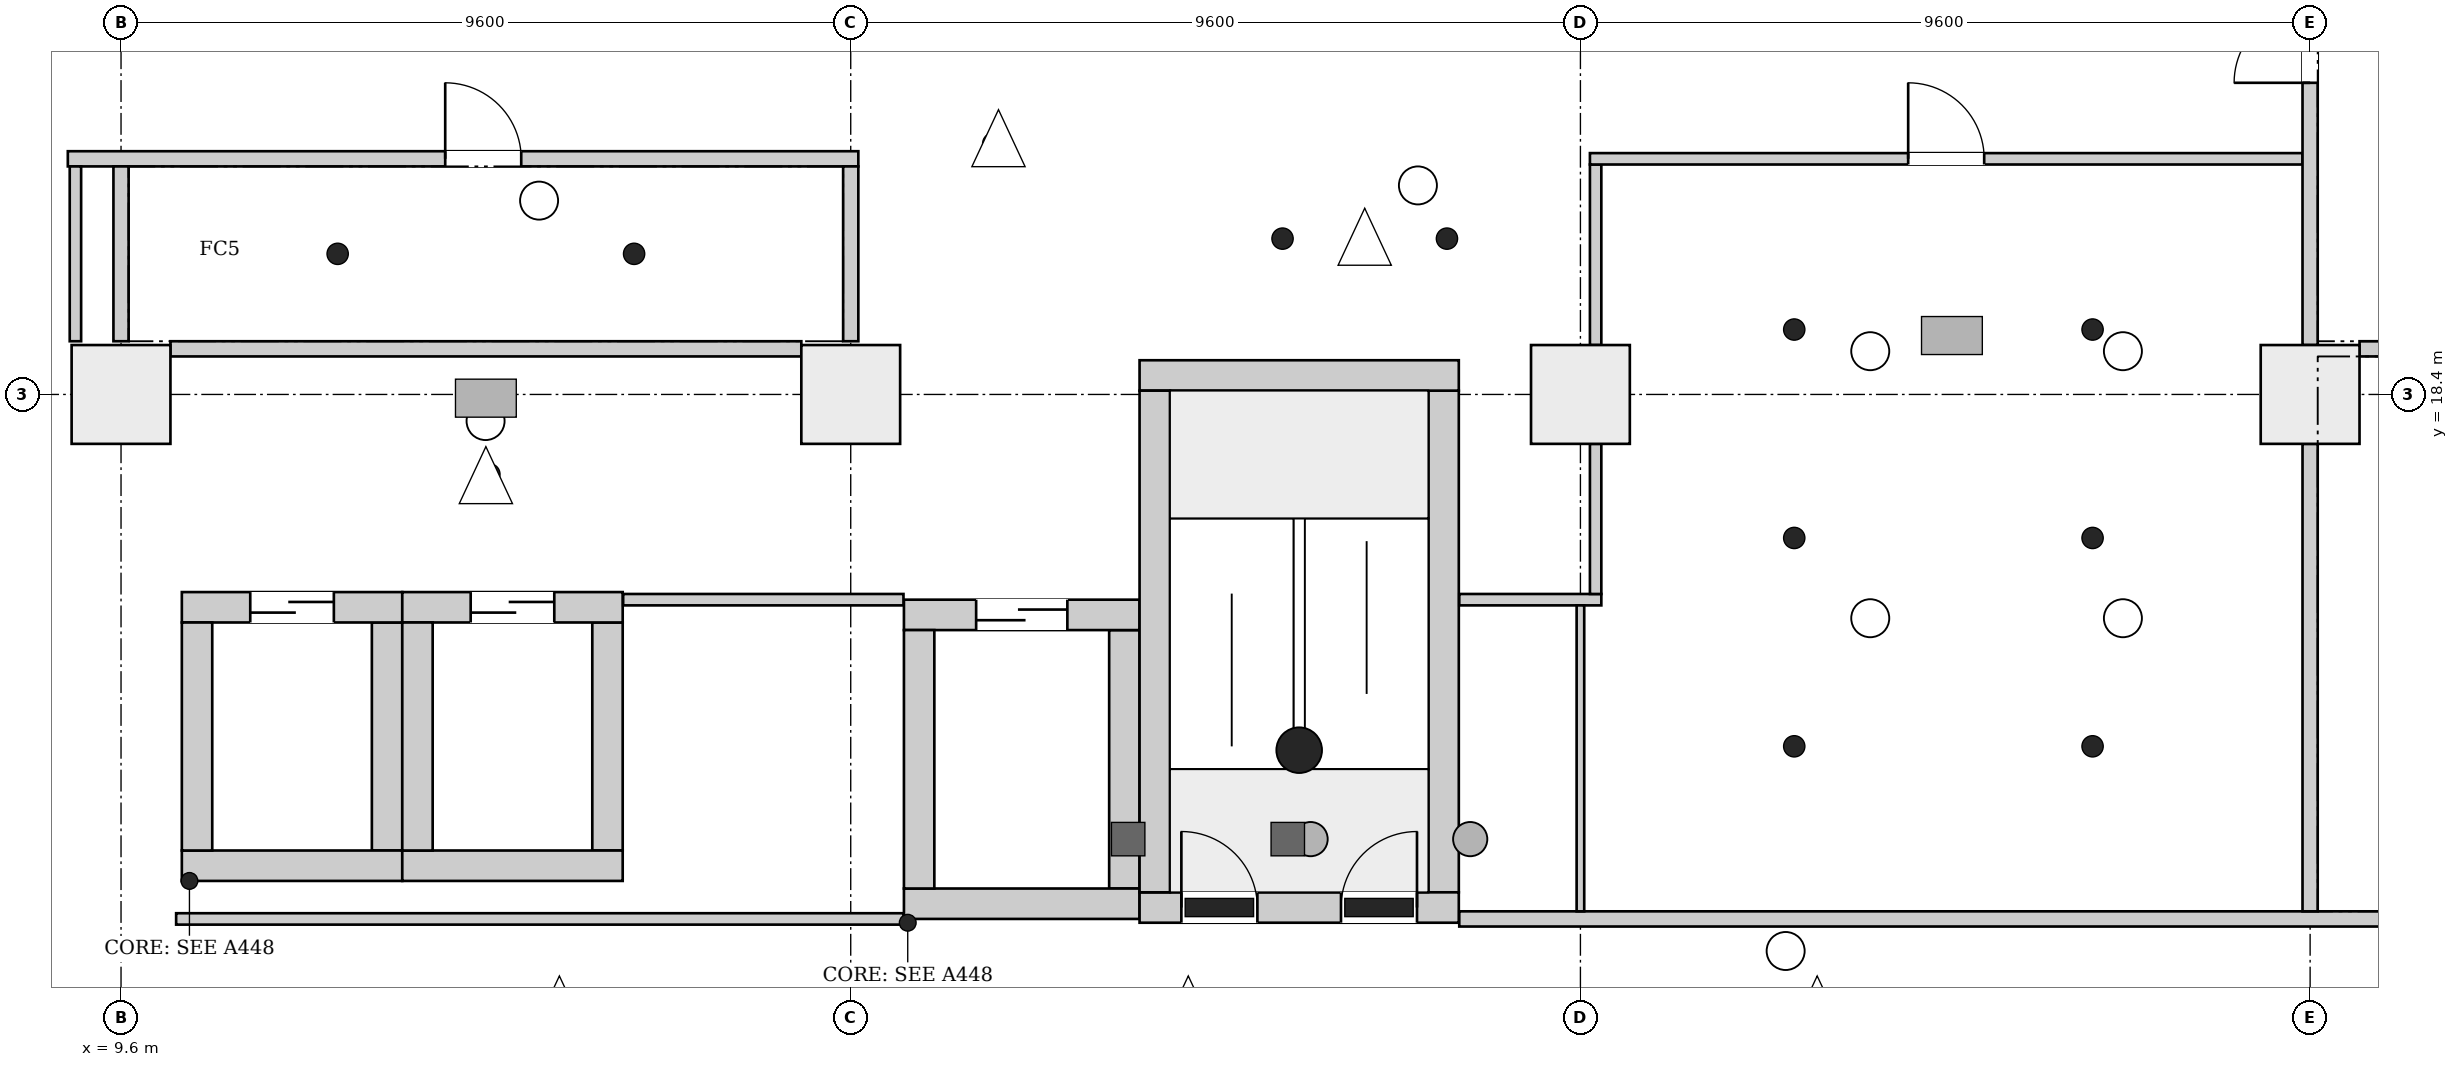
"""IFC4 building model, lengths in metres.
Left out: names, types, materials, properties, quantities, classifications, styles, units other than length and angle.
Written with IfcOpenShell. Run it as: python <this file> out.ifc"""

import sys

from ifc_helpers import new_model, si_unit, direction, frame, frame_2d, origin, origin_2d, place, context, subcontext, project, spatial, rectangle, extrude, element, fill, save


model = new_model("IFC4")
c1 = context("Model", 3, precision=1e-05, world=origin(), true_north=direction((0.0, 1.0)))
c2 = subcontext(c1, "Body", "Model", "MODEL_VIEW")
j1 = project(units=[si_unit("LENGTHUNIT", "METRE"), si_unit("PLANEANGLEUNIT", "RADIAN")], contexts=[c1])
p1 = place(None, origin())
s1 = spatial("IfcSite", under=j1, at=p1, CompositionType="ELEMENT")
p2 = place(p1, origin())
s2 = spatial("IfcBuilding", under=s1, at=p2, CompositionType="ELEMENT")
p3 = place(p2, frame((0.0, 0.0, 6.5)))
s3 = spatial("IfcBuildingStorey", under=s2, at=p3, CompositionType="ELEMENT", Elevation=6.5)
p4 = place(p3, frame((23.0, 11.65, 0.0), z_axis=(0.0, 0.0, 1.0), x_axis=(1.0, 0.0, 0.0)))
e1 = element("IfcWall", 1, at=p4, inside=s3, PredefinedType="SHEAR", context=c2, shape_type="SweptSolid", body=[
    extrude(rectangle(XDim=4.2, YDim=0.4, at=frame_2d((2.1, 0.0))), origin(), (0.0, 0.0, 1.0), 7.7),
])
p5 = place(p4, frame((0.55, 0.0, 0.0)))
e2 = element("IfcOpeningElement", 2, at=p5, cuts=e1, PredefinedType="OPENING", context=c2, shape_type="SweptSolid", body=[
    extrude(rectangle(XDim=1.0, YDim=2.1, at=frame_2d((0.5, 1.05))), frame((0.0, 0.21, 0.0), z_axis=(0.0, -1.0, 0.0), x_axis=(1.0, 0.0, 0.0)), (0.0, 0.0, 1.0), 0.42),
])
p6 = place(p4, frame((2.65, 0.0, 0.0)))
e3 = element("IfcOpeningElement", 3, at=p6, cuts=e1, PredefinedType="OPENING", context=c2, shape_type="SweptSolid", body=[
    extrude(rectangle(XDim=1.0, YDim=2.1, at=frame_2d((0.5, 1.05))), frame((0.0, 0.21, 0.0), z_axis=(0.0, -1.0, 0.0), x_axis=(1.0, 0.0, 0.0)), (0.0, 0.0, 1.0), 0.42),
])
p7 = place(p3, frame((23.0, 18.65, 0.0), z_axis=(0.0, 0.0, 1.0), x_axis=(1.0, 0.0, 0.0)))
e4 = element("IfcWall", 4, at=p7, inside=s3, PredefinedType="SHEAR", context=c2, shape_type="SweptSolid", body=[
    extrude(rectangle(XDim=4.2, YDim=0.4, at=frame_2d((2.1, 0.0))), origin(), (0.0, 0.0, 1.0), 7.7),
])
for number, where, z_axis, x_axis in (
    (5, (23.2, 11.85, 0.0), (0.0, 0.0, 1.0), (0.0, 1.0, 0.0)),
    (6, (27.0, 11.85, 0.0), (0.0, 0.0, 1.0), (0.0, 1.0, 0.0)),
):
    element("IfcWall", number, at=place(p3, frame(where, z_axis=z_axis, x_axis=x_axis)), inside=s3, PredefinedType="SHEAR", context=c2, shape_type="SweptSolid", body=[
        extrude(rectangle(XDim=6.6, YDim=0.4, at=frame_2d((3.3, 0.0))), origin(), (0.0, 0.0, 1.0), 7.7),
    ])
p8 = place(p3, frame((10.4, 12.2, 0.0), z_axis=(0.0, 0.0, 1.0), x_axis=(1.0, 0.0, 0.0)))
e7 = element("IfcWall", 7, at=p8, inside=s3, PredefinedType="SHEAR", context=c2, shape_type="SweptSolid", body=[
    extrude(rectangle(XDim=2.9, YDim=0.4, at=frame_2d((1.45, 0.0))), origin(), (0.0, 0.0, 1.0), 7.7),
])
p9 = place(p3, frame((10.4, 15.6, 0.0), z_axis=(0.0, 0.0, 1.0), x_axis=(1.0, 0.0, 0.0)))
e8 = element("IfcWall", 8, at=p9, inside=s3, PredefinedType="SHEAR", context=c2, shape_type="SweptSolid", body=[
    extrude(rectangle(XDim=2.9, YDim=0.4, at=frame_2d((1.45, 0.0))), origin(), (0.0, 0.0, 1.0), 7.7),
])
p10 = place(p9, frame((0.9, 0.0, 0.0)))
e9 = element("IfcOpeningElement", 9, at=p10, cuts=e8, PredefinedType="OPENING", context=c2, shape_type="SweptSolid", body=[
    extrude(rectangle(XDim=1.1, YDim=2.1, at=frame_2d((0.55, 1.05))), frame((0.0, 0.21, 0.0), z_axis=(0.0, -1.0, 0.0), x_axis=(1.0, 0.0, 0.0)), (0.0, 0.0, 1.0), 0.42),
])
for number, where, z_axis, x_axis in (
    (10, (10.6, 12.4, 0.0), (0.0, 0.0, 1.0), (0.0, 1.0, 0.0)),
    (11, (13.1, 12.4, 0.0), (0.0, 0.0, 1.0), (0.0, 1.0, 0.0)),
):
    element("IfcWall", number, at=place(p3, frame(where, z_axis=z_axis, x_axis=x_axis)), inside=s3, PredefinedType="SHEAR", context=c2, shape_type="SweptSolid", body=[
        extrude(rectangle(XDim=3.0, YDim=0.4, at=frame_2d((1.5, 0.0))), origin(), (0.0, 0.0, 1.0), 7.7),
    ])
p11 = place(p3, frame((13.3, 12.2, 0.0), z_axis=(0.0, 0.0, 1.0), x_axis=(1.0, 0.0, 0.0)))
e12 = element("IfcWall", 12, at=p11, inside=s3, PredefinedType="SHEAR", context=c2, shape_type="SweptSolid", body=[
    extrude(rectangle(XDim=2.9, YDim=0.4, at=frame_2d((1.45, 0.0))), origin(), (0.0, 0.0, 1.0), 7.7),
])
p12 = place(p3, frame((13.3, 15.6, 0.0), z_axis=(0.0, 0.0, 1.0), x_axis=(1.0, 0.0, 0.0)))
e13 = element("IfcWall", 13, at=p12, inside=s3, PredefinedType="SHEAR", context=c2, shape_type="SweptSolid", body=[
    extrude(rectangle(XDim=2.9, YDim=0.4, at=frame_2d((1.45, 0.0))), origin(), (0.0, 0.0, 1.0), 7.7),
])
p13 = place(p12, frame((0.9, 0.0, 0.0)))
e14 = element("IfcOpeningElement", 14, at=p13, cuts=e13, PredefinedType="OPENING", context=c2, shape_type="SweptSolid", body=[
    extrude(rectangle(XDim=1.1, YDim=2.1, at=frame_2d((0.55, 1.05))), frame((0.0, 0.21, 0.0), z_axis=(0.0, -1.0, 0.0), x_axis=(1.0, 0.0, 0.0)), (0.0, 0.0, 1.0), 0.42),
])
for number, where, z_axis, x_axis in (
    (15, (13.5, 12.4, 0.0), (0.0, 0.0, 1.0), (0.0, 1.0, 0.0)),
    (16, (16.0, 12.4, 0.0), (0.0, 0.0, 1.0), (0.0, 1.0, 0.0)),
):
    element("IfcWall", number, at=place(p3, frame(where, z_axis=z_axis, x_axis=x_axis)), inside=s3, PredefinedType="SHEAR", context=c2, shape_type="SweptSolid", body=[
        extrude(rectangle(XDim=3.0, YDim=0.4, at=frame_2d((1.5, 0.0))), origin(), (0.0, 0.0, 1.0), 7.7),
    ])
p14 = place(p3, frame((19.9, 11.7, 0.0), z_axis=(0.0, 0.0, 1.0), x_axis=(1.0, 0.0, 0.0)))
e17 = element("IfcWall", 17, at=p14, inside=s3, PredefinedType="SHEAR", context=c2, shape_type="SweptSolid", body=[
    extrude(rectangle(XDim=3.1, YDim=0.4, at=frame_2d((1.55, 0.0))), origin(), (0.0, 0.0, 1.0), 7.7),
])
p15 = place(p3, frame((19.9, 15.5, 0.0), z_axis=(0.0, 0.0, 1.0), x_axis=(1.0, 0.0, 0.0)))
e18 = element("IfcWall", 18, at=p15, inside=s3, PredefinedType="SHEAR", context=c2, shape_type="SweptSolid", body=[
    extrude(rectangle(XDim=3.1, YDim=0.4, at=frame_2d((1.55, 0.0))), origin(), (0.0, 0.0, 1.0), 7.7),
])
p16 = place(p15, frame((0.95, 0.0, 0.0)))
e19 = element("IfcOpeningElement", 19, at=p16, cuts=e18, PredefinedType="OPENING", context=c2, shape_type="SweptSolid", body=[
    extrude(rectangle(XDim=1.2, YDim=2.1, at=frame_2d((0.6, 1.05))), frame((0.0, 0.21, 0.0), z_axis=(0.0, -1.0, 0.0), x_axis=(1.0, 0.0, 0.0)), (0.0, 0.0, 1.0), 0.42),
])
for number, where, z_axis, x_axis in (
    (20, (20.1, 11.9, 0.0), (0.0, 0.0, 1.0), (0.0, 1.0, 0.0)),
    (21, (22.8, 11.9, 0.0), (0.0, 0.0, 1.0), (0.0, 1.0, 0.0)),
):
    element("IfcWall", number, at=place(p3, frame(where, z_axis=z_axis, x_axis=x_axis)), inside=s3, PredefinedType="SHEAR", context=c2, shape_type="SweptSolid", body=[
        extrude(rectangle(XDim=3.4, YDim=0.4, at=frame_2d((1.7, 0.0))), origin(), (0.0, 0.0, 1.0), 7.7),
    ])
for number, where, z_axis, x_axis in (
    (22, (9.6, 18.4, 0.0), (0.0, 0.0, 1.0), (1.0, 0.0, 0.0)),
    (23, (19.2, 18.4, 0.0), (0.0, 0.0, 1.0), (1.0, 0.0, 0.0)),
    (24, (28.8, 18.4, 0.0), (0.0, 0.0, 1.0), (1.0, 0.0, 0.0)),
    (25, (38.4, 18.4, 0.0), (0.0, 0.0, 1.0), (1.0, 0.0, 0.0)),
):
    element("IfcColumn", number, at=place(p3, frame(where, z_axis=z_axis, x_axis=x_axis)), inside=s3, PredefinedType="COLUMN", context=c2, shape_type="SweptSolid", body=[
        extrude(rectangle(XDim=1.3, YDim=1.3, at=origin_2d()), origin(), (0.0, 0.0, 1.0), 7.7),
    ])
p17 = place(p3, frame((8.9, 21.5, 0.0), z_axis=(0.0, 0.0, 1.0), x_axis=(1.0, 0.0, 0.0)))
e26 = element("IfcWall", 26, at=p17, inside=s3, PredefinedType="PARTITIONING", context=c2, shape_type="SweptSolid", body=[
    extrude(rectangle(XDim=10.4, YDim=0.2, at=frame_2d((5.2, 0.0))), origin(), (0.0, 0.0, 1.0), 7.35),
])
p18 = place(p17, frame((4.965, 0.0, 0.0)))
e27 = element("IfcOpeningElement", 27, at=p18, cuts=e26, PredefinedType="OPENING", context=c2, shape_type="SweptSolid", body=[
    extrude(rectangle(XDim=1.0, YDim=2.1, at=frame_2d((0.5, 1.05))), frame((0.0, 0.11, 0.0), z_axis=(0.0, -1.0, 0.0), x_axis=(1.0, 0.0, 0.0)), (0.0, 0.0, 1.0), 0.22),
])
p19 = place(p3, frame((9.0, 19.1, 0.0), z_axis=(0.0, 0.0, 1.0), x_axis=(0.0, 1.0, 0.0)))
e28 = element("IfcWall", 28, at=p19, inside=s3, PredefinedType="PARTITIONING", context=c2, shape_type="SweptSolid", body=[
    extrude(rectangle(XDim=2.3, YDim=0.15, at=frame_2d((1.15, 0.0))), origin(), (0.0, 0.0, 1.0), 6.95),
])
p20 = place(p3, frame((9.6, 19.1, 0.0), z_axis=(0.0, 0.0, 1.0), x_axis=(0.0, 1.0, 0.0)))
e29 = element("IfcWall", 29, at=p20, inside=s3, PredefinedType="PARTITIONING", context=c2, shape_type="SweptSolid", body=[
    extrude(rectangle(XDim=2.3, YDim=0.2, at=frame_2d((1.15, 0.0))), origin(), (0.0, 0.0, 1.0), 6.95),
])
p21 = place(p3, frame((10.25, 19.0, 0.0), z_axis=(0.0, 0.0, 1.0), x_axis=(1.0, 0.0, 0.0)))
e30 = element("IfcWall", 30, at=p21, inside=s3, PredefinedType="PARTITIONING", context=c2, shape_type="SweptSolid", body=[
    extrude(rectangle(XDim=8.3, YDim=0.2, at=frame_2d((4.15, 0.0))), origin(), (0.0, 0.0, 1.0), 7.35),
])
p22 = place(p3, frame((10.325, 11.5, 0.0), z_axis=(0.0, 0.0, 1.0), x_axis=(1.0, 0.0, 0.0)))
e31 = element("IfcWall", 31, at=p22, inside=s3, PredefinedType="PARTITIONING", context=c2, shape_type="SweptSolid", body=[
    extrude(rectangle(XDim=9.569, YDim=0.15, at=frame_2d((4.785, 0.0))), origin(), (0.0, 0.0, 1.0), 7.35),
])
p23 = place(p3, frame((16.206, 15.7, 0.0), z_axis=(0.0, 0.0, 1.0), x_axis=(1.0, 0.0, 0.0)))
e32 = element("IfcWall", 32, at=p23, inside=s3, PredefinedType="PARTITIONING", context=c2, shape_type="SweptSolid", body=[
    extrude(rectangle(XDim=3.688, YDim=0.15, at=frame_2d((1.844, 0.0))), origin(), (0.0, 0.0, 1.0), 7.35),
])
p24 = place(p3, frame((19.2, 19.1, 0.0), z_axis=(0.0, 0.0, 1.0), x_axis=(0.0, 1.0, 0.0)))
e33 = element("IfcWall", 33, at=p24, inside=s3, PredefinedType="PARTITIONING", context=c2, shape_type="SweptSolid", body=[
    extrude(rectangle(XDim=2.3, YDim=0.2, at=frame_2d((1.15, 0.0))), origin(), (0.0, 0.0, 1.0), 6.95),
])
p25 = place(p3, frame((27.206, 11.5, 0.0), z_axis=(0.0, 0.0, 1.0), x_axis=(1.0, 0.0, 0.0)))
e34 = element("IfcWall", 34, at=p25, inside=s3, PredefinedType="PARTITIONING", context=c2, shape_type="SweptSolid", body=[
    extrude(rectangle(XDim=26.494, YDim=0.2, at=frame_2d((13.247, 0.0))), origin(), (0.0, 0.0, 1.0), 7.35),
])
p26 = place(p25, frame((15.494, 0.0, 0.0)))
e35 = element("IfcOpeningElement", 35, at=p26, cuts=e34, PredefinedType="OPENING", context=c2, shape_type="SweptSolid", body=[
    extrude(rectangle(XDim=1.0, YDim=2.1, at=frame_2d((0.5, 1.05))), frame((0.0, 0.11, 0.0), z_axis=(0.0, -1.0, 0.0), x_axis=(1.0, 0.0, 0.0)), (0.0, 0.0, 1.0), 0.22),
])
p27 = place(p25, frame((23.059, 0.0, 0.0)))
e36 = element("IfcOpeningElement", 36, at=p27, cuts=e34, PredefinedType="OPENING", context=c2, shape_type="SweptSolid", body=[
    extrude(rectangle(XDim=1.0, YDim=2.1, at=frame_2d((0.5, 1.05))), frame((0.0, 0.11, 0.0), z_axis=(0.0, -1.0, 0.0), x_axis=(1.0, 0.0, 0.0)), (0.0, 0.0, 1.0), 0.22),
])
p28 = place(p3, frame((27.206, 15.7, 0.0), z_axis=(0.0, 0.0, 1.0), x_axis=(1.0, 0.0, 0.0)))
e37 = element("IfcWall", 37, at=p28, inside=s3, PredefinedType="PARTITIONING", context=c2, shape_type="SweptSolid", body=[
    extrude(rectangle(XDim=1.869, YDim=0.15, at=frame_2d((0.935, 0.0))), origin(), (0.0, 0.0, 1.0), 7.35),
])
p29 = place(p3, frame((28.8, 11.6, 0.0), z_axis=(0.0, 0.0, 1.0), x_axis=(0.0, 1.0, 0.0)))
e38 = element("IfcWall", 38, at=p29, inside=s3, PredefinedType="PARTITIONING", context=c2, shape_type="SweptSolid", body=[
    extrude(rectangle(XDim=4.025, YDim=0.1, at=frame_2d((2.012, 0.0))), origin(), (0.0, 0.0, 1.0), 6.95),
])
p30 = place(p3, frame((29.0, 15.775, 0.0), z_axis=(0.0, 0.0, 1.0), x_axis=(0.0, 1.0, 0.0)))
e39 = element("IfcWall", 39, at=p30, inside=s3, PredefinedType="PARTITIONING", context=c2, shape_type="SweptSolid", body=[
    extrude(rectangle(XDim=1.975, YDim=0.15, at=frame_2d((0.988, 0.0))), origin(), (0.0, 0.0, 1.0), 6.95),
])
p31 = place(p3, frame((29.0, 19.05, 0.0), z_axis=(0.0, 0.0, 1.0), x_axis=(0.0, 1.0, 0.0)))
e40 = element("IfcWall", 40, at=p31, inside=s3, PredefinedType="PARTITIONING", context=c2, shape_type="SweptSolid", body=[
    extrude(rectangle(XDim=2.375, YDim=0.15, at=frame_2d((1.188, 0.0))), origin(), (0.0, 0.0, 1.0), 6.95),
])
p32 = place(p3, frame((28.925, 21.5, 0.0), z_axis=(0.0, 0.0, 1.0), x_axis=(1.0, 0.0, 0.0)))
e41 = element("IfcWall", 41, at=p32, inside=s3, PredefinedType="PARTITIONING", context=c2, shape_type="SweptSolid", body=[
    extrude(rectangle(XDim=9.375, YDim=0.15, at=frame_2d((4.688, 0.0))), origin(), (0.0, 0.0, 1.0), 7.35),
])
p33 = place(p32, frame((4.187, 0.0, 0.0)))
e42 = element("IfcOpeningElement", 42, at=p33, cuts=e41, PredefinedType="OPENING", context=c2, shape_type="SweptSolid", body=[
    extrude(rectangle(XDim=1.0, YDim=2.1, at=frame_2d((0.5, 1.05))), frame((0.0, 0.085, 0.0), z_axis=(0.0, -1.0, 0.0), x_axis=(1.0, 0.0, 0.0)), (0.0, 0.0, 1.0), 0.17),
])
p34 = place(p3, frame((38.4, 11.6, 0.0), z_axis=(0.0, 0.0, 1.0), x_axis=(0.0, 1.0, 0.0)))
e43 = element("IfcWall", 43, at=p34, inside=s3, PredefinedType="PARTITIONING", context=c2, shape_type="SweptSolid", body=[
    extrude(rectangle(XDim=6.15, YDim=0.2, at=frame_2d((3.075, 0.0))), origin(), (0.0, 0.0, 1.0), 6.95),
])
p35 = place(p3, frame((38.4, 19.05, 0.0), z_axis=(0.0, 0.0, 1.0), x_axis=(0.0, 1.0, 0.0)))
e44 = element("IfcWall", 44, at=p35, inside=s3, PredefinedType="PARTITIONING", context=c2, shape_type="SweptSolid", body=[
    extrude(rectangle(XDim=7.9, YDim=0.2, at=frame_2d((3.95, 0.0))), origin(), (0.0, 0.0, 1.0), 6.95),
])
p36 = place(p35, frame((3.45, 0.0, 0.0)))
e45 = element("IfcOpeningElement", 45, at=p36, cuts=e44, PredefinedType="OPENING", context=c2, shape_type="SweptSolid", body=[
    extrude(rectangle(XDim=1.0, YDim=2.1, at=frame_2d((0.5, 1.05))), frame((0.0, 0.11, 0.0), z_axis=(0.0, -1.0, 0.0), x_axis=(1.0, 0.0, 0.0)), (0.0, 0.0, 1.0), 0.22),
])
p37 = place(p3, frame((39.05, 19.0, 0.0), z_axis=(0.0, 0.0, 1.0), x_axis=(1.0, 0.0, 0.0)))
e46 = element("IfcWall", 46, at=p37, inside=s3, PredefinedType="PARTITIONING", context=c2, shape_type="SweptSolid", body=[
    extrude(rectangle(XDim=8.3, YDim=0.2, at=frame_2d((4.15, 0.0))), origin(), (0.0, 0.0, 1.0), 7.35),
])
p38 = place(p5, origin())
e47 = element("IfcDoor", 47, at=p38, inside=s3, OperationType="SINGLE_SWING_RIGHT", PredefinedType="DOOR", context=c2, shape_type="SweptSolid", body=[
    extrude(rectangle(XDim=1.0, YDim=2.1, at=frame_2d((0.5, 1.05))), frame((0.0, 0.025, 0.0), z_axis=(0.0, -1.0, 0.0), x_axis=(1.0, 0.0, 0.0)), (0.0, 0.0, 1.0), 0.05),
])
fill(e2, e47)
p39 = place(p6, origin())
e48 = element("IfcDoor", 48, at=p39, inside=s3, OperationType="SINGLE_SWING_LEFT", PredefinedType="DOOR", context=c2, shape_type="SweptSolid", body=[
    extrude(rectangle(XDim=1.0, YDim=2.1, at=frame_2d((0.5, 1.05))), frame((0.0, 0.025, 0.0), z_axis=(0.0, -1.0, 0.0), x_axis=(1.0, 0.0, 0.0)), (0.0, 0.0, 1.0), 0.05),
])
fill(e3, e48)
p40 = place(p10, origin())
e49 = element("IfcDoor", 49, at=p40, inside=s3, OperationType="DOUBLE_DOOR_SLIDING", PredefinedType="DOOR", context=c2, shape_type="SweptSolid", body=[
    extrude(rectangle(XDim=1.1, YDim=2.1, at=frame_2d((0.55, 1.05))), frame((0.0, 0.025, 0.0), z_axis=(0.0, -1.0, 0.0), x_axis=(1.0, 0.0, 0.0)), (0.0, 0.0, 1.0), 0.05),
])
fill(e9, e49)
p41 = place(p13, origin())
e50 = element("IfcDoor", 50, at=p41, inside=s3, OperationType="DOUBLE_DOOR_SLIDING", PredefinedType="DOOR", context=c2, shape_type="SweptSolid", body=[
    extrude(rectangle(XDim=1.1, YDim=2.1, at=frame_2d((0.55, 1.05))), frame((0.0, 0.025, 0.0), z_axis=(0.0, -1.0, 0.0), x_axis=(1.0, 0.0, 0.0)), (0.0, 0.0, 1.0), 0.05),
])
fill(e14, e50)
p42 = place(p16, origin())
e51 = element("IfcDoor", 51, at=p42, inside=s3, OperationType="DOUBLE_DOOR_SLIDING", PredefinedType="DOOR", context=c2, shape_type="SweptSolid", body=[
    extrude(rectangle(XDim=1.2, YDim=2.1, at=frame_2d((0.6, 1.05))), frame((0.0, 0.025, 0.0), z_axis=(0.0, -1.0, 0.0), x_axis=(1.0, 0.0, 0.0)), (0.0, 0.0, 1.0), 0.05),
])
fill(e19, e51)
p43 = place(p18, origin())
e52 = element("IfcDoor", 52, at=p43, inside=s3, OperationType="SINGLE_SWING_RIGHT", PredefinedType="DOOR", context=c2, shape_type="SweptSolid", body=[
    extrude(rectangle(XDim=1.0, YDim=2.1, at=frame_2d((0.5, 1.05))), frame((0.0, 0.025, 0.0), z_axis=(0.0, -1.0, 0.0), x_axis=(1.0, 0.0, 0.0)), (0.0, 0.0, 1.0), 0.05),
])
fill(e27, e52)
p44 = place(p33, origin())
e53 = element("IfcDoor", 53, at=p44, inside=s3, OperationType="SINGLE_SWING_RIGHT", PredefinedType="DOOR", context=c2, shape_type="SweptSolid", body=[
    extrude(rectangle(XDim=1.0, YDim=2.1, at=frame_2d((0.5, 1.05))), frame((0.0, 0.025, 0.0), z_axis=(0.0, -1.0, 0.0), x_axis=(1.0, 0.0, 0.0)), (0.0, 0.0, 1.0), 0.05),
])
fill(e42, e53)
p45 = place(p36, origin())
e54 = element("IfcDoor", 54, at=p45, inside=s3, OperationType="SINGLE_SWING_LEFT", PredefinedType="DOOR", context=c2, shape_type="SweptSolid", body=[
    extrude(rectangle(XDim=1.0, YDim=2.1, at=frame_2d((0.5, 1.05))), frame((0.0, 0.025, 0.0), z_axis=(0.0, -1.0, 0.0), x_axis=(1.0, 0.0, 0.0)), (0.0, 0.0, 1.0), 0.05),
])
fill(e45, e54)
save(model, sys.argv[1])
